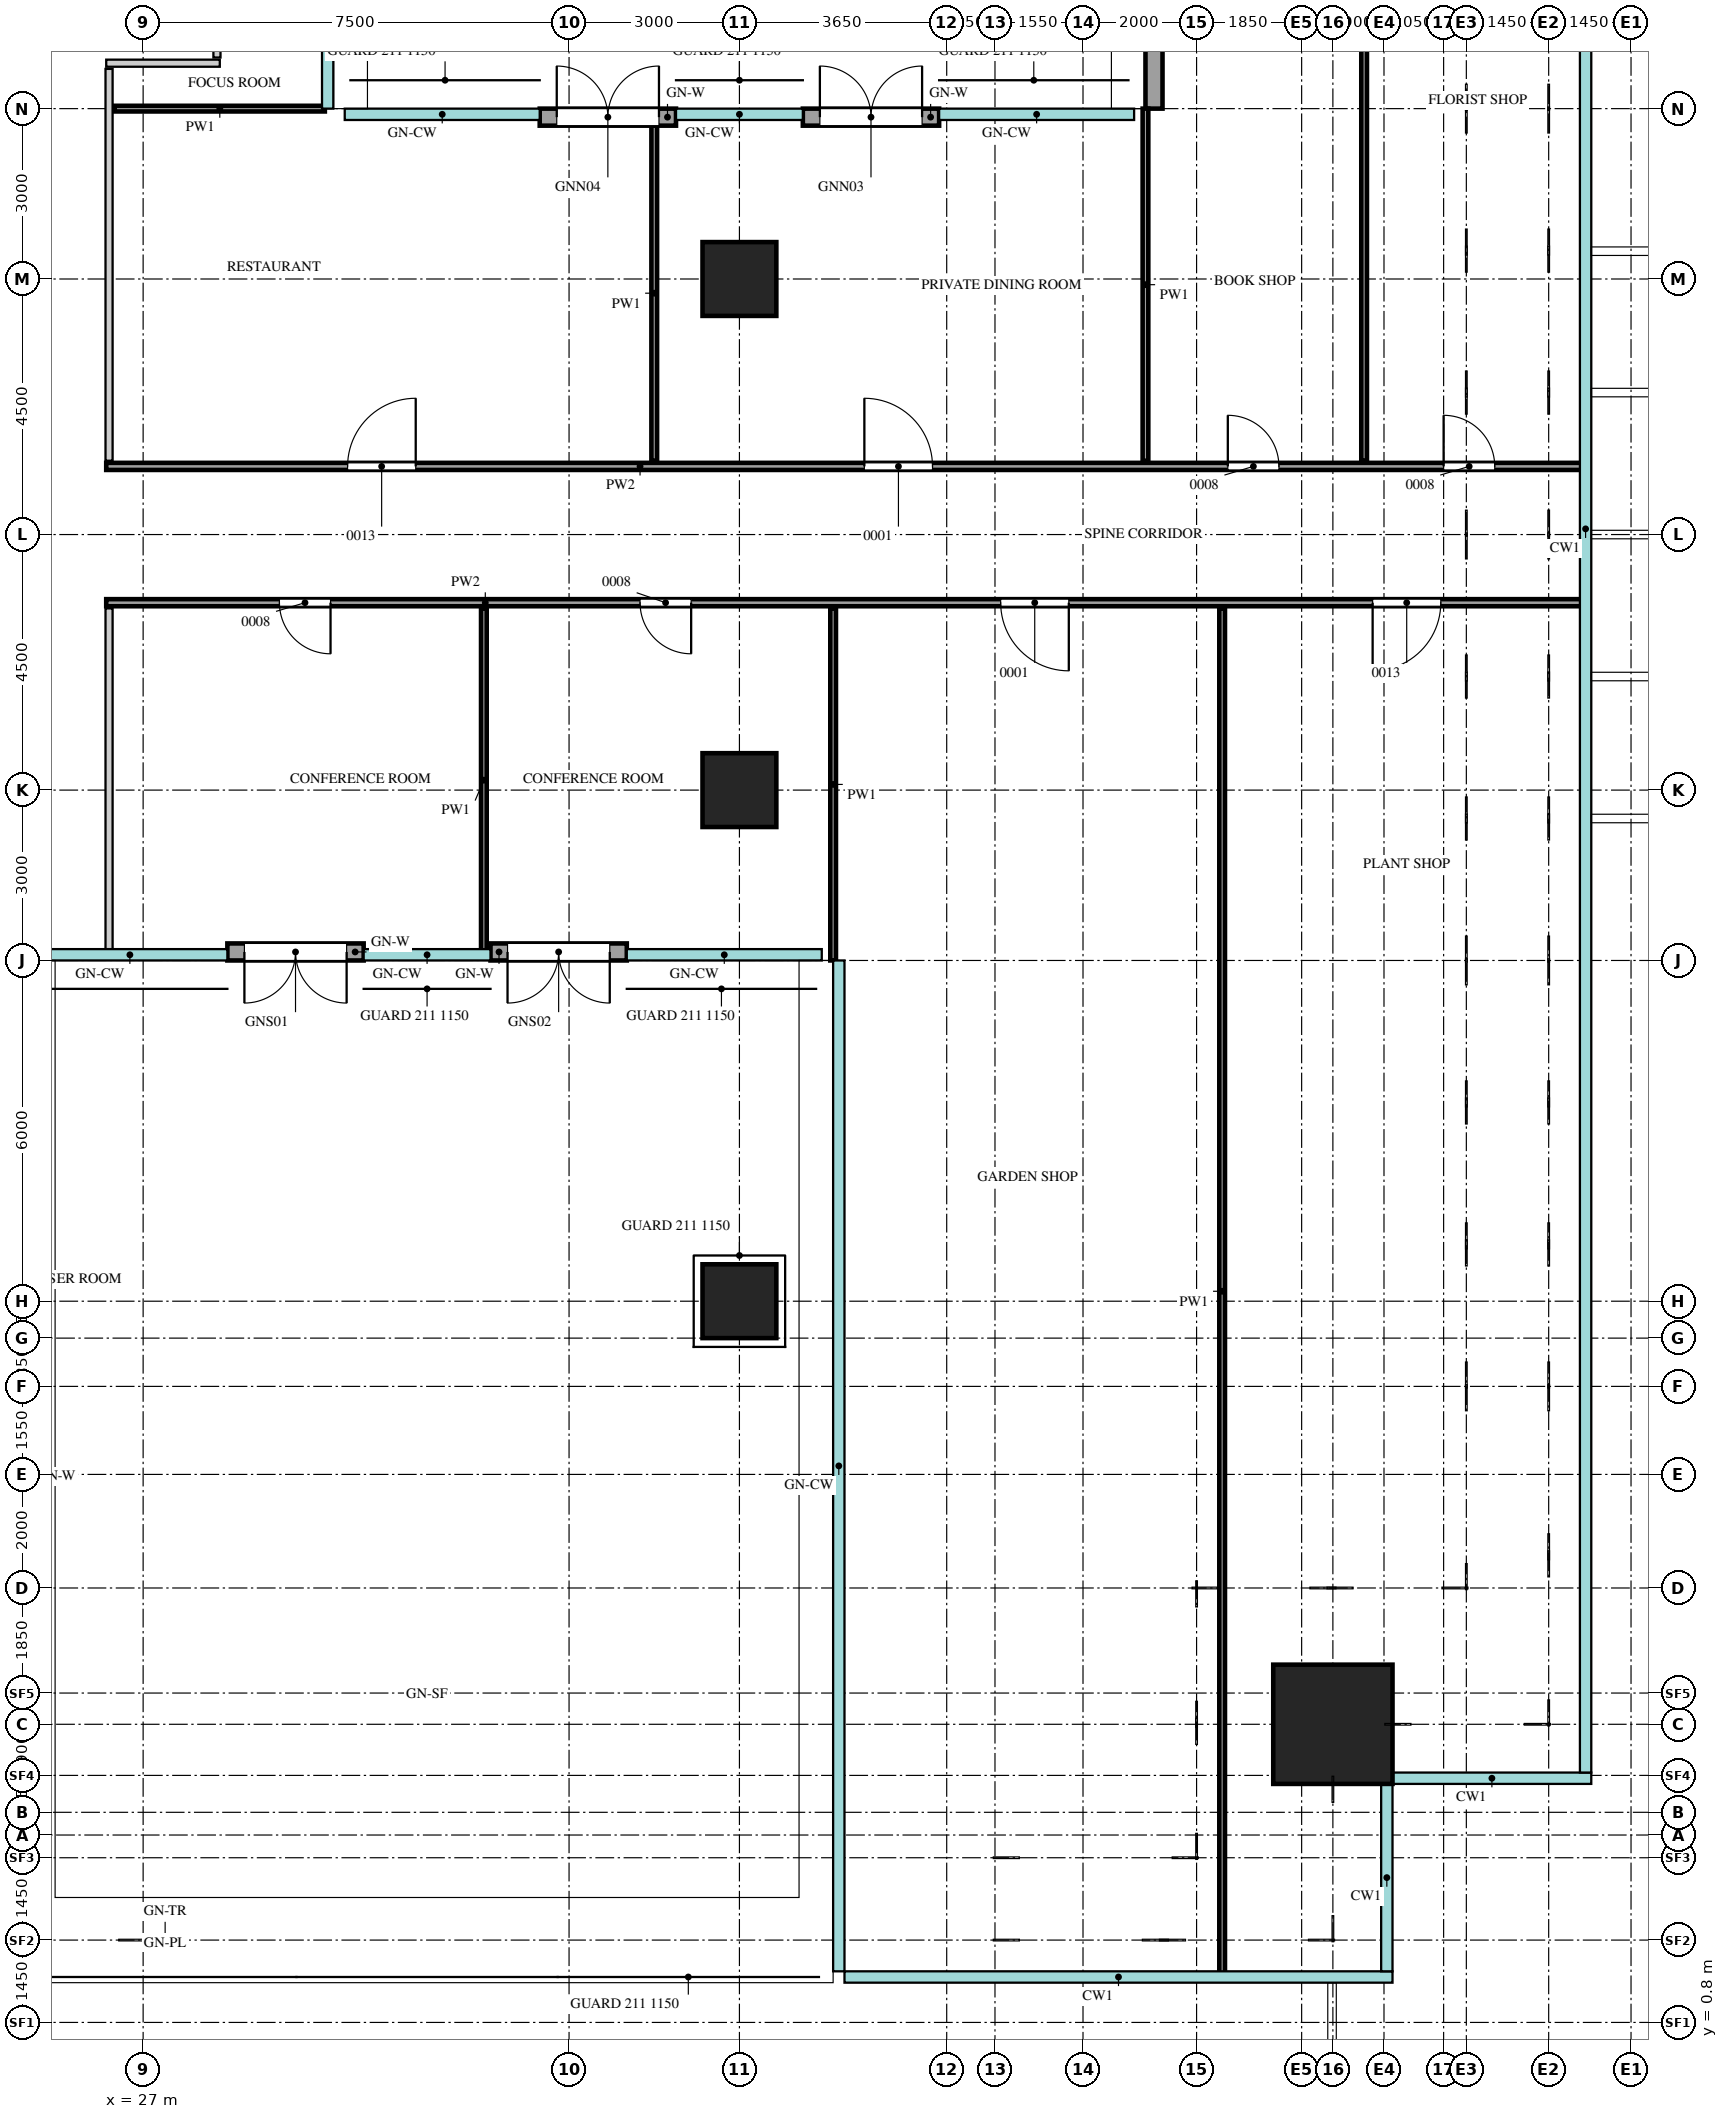
"""IFC4 building model, lengths in metres.
Left out: names, types, materials, properties, quantities, classifications, styles, units other than length and angle.
Written with IfcOpenShell. Run it as: python <this file> out.ifc"""

import sys

from ifc_helpers import new_model, si_unit, direction, frame, frame_2d, origin, origin_2d, place, context, subcontext, project, spatial, rectangle, extrude, source, transform, mapped, element, fill, save


model = new_model("IFC4")
c1 = context("Model", 3, precision=1e-05, world=origin(), true_north=direction((0.0, 1.0)))
c2 = subcontext(c1, "Body", "Model", "MODEL_VIEW")
j1 = project(units=[si_unit("LENGTHUNIT", "METRE"), si_unit("PLANEANGLEUNIT", "RADIAN")], contexts=[c1])
p1 = place(None, origin())
s1 = spatial("IfcSite", under=j1, at=p1, CompositionType="ELEMENT")
p2 = place(p1, origin())
s2 = spatial("IfcBuilding", under=s1, at=p2, CompositionType="ELEMENT")
p3 = place(p2, frame((0.0, 0.0, 158.7)))
s3 = spatial("IfcBuildingStorey", under=s2, at=p3, CompositionType="ELEMENT", Elevation=158.7)
m1 = source(origin(), c2, "Body", "SweptSolid", [
    extrude(rectangle(XDim=2.1, YDim=2.1, at=origin_2d()), origin(), (0.0, 0.0, 1.0), 6.0),
])
p4 = place(p3, frame((47.95, 6.05, 0.0), z_axis=(0.0, 0.0, 1.0), x_axis=(1.0, 0.0, 0.0)))
e1 = element("IfcColumn", 1, at=p4, inside=s3, PredefinedType="COLUMN", context=c2, shape_type="MappedRepresentation", body=[
    mapped(m1, transform((0.0, 0.0, 0.0))),
])
m2 = source(origin(), c2, "Body", "SweptSolid", [
    extrude(rectangle(XDim=1.3, YDim=1.3, at=origin_2d()), origin(), (0.0, 0.0, 1.0), 6.0),
])
p5 = place(p3, frame((37.5, 13.5, 0.0), z_axis=(0.0, 0.0, 1.0), x_axis=(1.0, 0.0, 0.0)))
e2 = element("IfcColumn", 2, at=p5, inside=s3, PredefinedType="COLUMN", context=c2, shape_type="MappedRepresentation", body=[
    mapped(m2, transform((0.0, 0.0, 0.0))),
])
m3 = source(origin(), c2, "Body", "SweptSolid", [
    extrude(rectangle(XDim=1.3, YDim=1.3, at=origin_2d()), origin(), (0.0, 0.0, 1.0), 5.75),
])
for number, where, z_axis, x_axis in (
    (3, (37.5, 22.5, 0.0), (0.0, 0.0, 1.0), (1.0, 0.0, 0.0)),
    (4, (37.5, 31.5, 0.0), (0.0, 0.0, 1.0), (1.0, 0.0, 0.0)),
):
    element("IfcColumn", number, at=place(p3, frame(where, z_axis=z_axis, x_axis=x_axis)), inside=s3, PredefinedType="COLUMN", context=c2, shape_type="MappedRepresentation", body=[
        mapped(m3, transform((0.0, 0.0, 0.0))),
    ])
m4 = source(origin(), c2, "Body", "SweptSolid", [
    extrude(rectangle(XDim=2.4, YDim=0.3, at=frame_2d((1.2, 0.0))), origin(), (0.0, 0.0, 1.0), 5.55),
])
p6 = place(p3, frame((28.483, 19.65, 0.0), z_axis=(0.0, 0.0, 1.0), x_axis=(1.0, 0.0, 0.0)))
e5 = element("IfcWall", 5, at=p6, inside=s3, PredefinedType="SOLIDWALL", context=c2, shape_type="MappedRepresentation", body=[
    mapped(m4, transform((0.0, 0.0, 0.0))),
])
m5 = source(origin(), c2, "Body", "SweptSolid", [
    extrude(rectangle(XDim=1.8, YDim=2.4, at=frame_2d((0.9, 1.2))), frame((0.0, 0.16, 0.0), z_axis=(0.0, -1.0, 0.0), x_axis=(1.0, 0.0, 0.0)), (0.0, 0.0, 1.0), 0.32),
])
p7 = place(p6, frame((2.1, 0.0, 0.0), z_axis=(0.0, 0.0, 1.0), x_axis=(-1.0, 0.0, 0.0)))
e6 = element("IfcOpeningElement", 6, at=p7, cuts=e5, PredefinedType="OPENING", context=c2, shape_type="MappedRepresentation", body=[
    mapped(m5, transform((0.0, 0.0, 0.0))),
])
p8 = place(p3, frame((33.117, 19.65, 0.0), z_axis=(0.0, 0.0, 1.0), x_axis=(1.0, 0.0, 0.0)))
e7 = element("IfcWall", 7, at=p8, inside=s3, PredefinedType="SOLIDWALL", context=c2, shape_type="MappedRepresentation", body=[
    mapped(m4, transform((0.0, 0.0, 0.0))),
])
p9 = place(p8, frame((2.1, 0.0, 0.0), z_axis=(0.0, 0.0, 1.0), x_axis=(-1.0, 0.0, 0.0)))
e8 = element("IfcOpeningElement", 8, at=p9, cuts=e7, PredefinedType="OPENING", context=c2, shape_type="MappedRepresentation", body=[
    mapped(m5, transform((0.0, 0.0, 0.0))),
])
m6 = source(origin(), c2, "Body", "SweptSolid", [
    extrude(rectangle(XDim=17.8, YDim=0.3, at=frame_2d((8.9, 0.0))), origin(), (0.0, 0.0, 1.0), 5.55),
])
p10 = place(p3, frame((44.8, 52.3, 0.0), z_axis=(0.0, 0.0, 1.0), x_axis=(0.0, -1.0, 0.0)))
e9 = element("IfcWall", 9, at=p10, inside=s3, PredefinedType="SOLIDWALL", context=c2, shape_type="MappedRepresentation", body=[
    mapped(m6, transform((0.0, 0.0, 0.0))),
])
p11 = place(p3, frame((41.017, 34.35, 0.0), z_axis=(0.0, 0.0, 1.0), x_axis=(-1.0, 0.0, 0.0)))
e10 = element("IfcWall", 10, at=p11, inside=s3, PredefinedType="SOLIDWALL", context=c2, shape_type="MappedRepresentation", body=[
    mapped(m4, transform((0.0, 0.0, 0.0))),
])
p12 = place(p11, frame((2.1, 0.0, 0.0), z_axis=(0.0, 0.0, 1.0), x_axis=(-1.0, 0.0, 0.0)))
e11 = element("IfcOpeningElement", 11, at=p12, cuts=e10, PredefinedType="OPENING", context=c2, shape_type="MappedRepresentation", body=[
    mapped(m5, transform((0.0, 0.0, 0.0))),
])
p13 = place(p3, frame((36.383, 34.35, 0.0), z_axis=(0.0, 0.0, 1.0), x_axis=(-1.0, 0.0, 0.0)))
e12 = element("IfcWall", 12, at=p13, inside=s3, PredefinedType="SOLIDWALL", context=c2, shape_type="MappedRepresentation", body=[
    mapped(m4, transform((0.0, 0.0, 0.0))),
])
p14 = place(p13, frame((2.1, 0.0, 0.0), z_axis=(0.0, 0.0, 1.0), x_axis=(-1.0, 0.0, 0.0)))
e13 = element("IfcOpeningElement", 13, at=p14, cuts=e12, PredefinedType="OPENING", context=c2, shape_type="MappedRepresentation", body=[
    mapped(m5, transform((0.0, 0.0, 0.0))),
])
m7 = source(origin(), c2, "Body", "SweptSolid", [
    extrude(rectangle(XDim=24.05, YDim=0.1, at=frame_2d((12.025, 0.0))), origin(), (0.0, 0.0, 1.0), 5.75),
])
p15 = place(p3, frame((46.0, 1.65, 0.0), z_axis=(0.0, 0.0, 1.0), x_axis=(0.0, 1.0, 0.0)))
e14 = element("IfcWall", 14, at=p15, inside=s3, PredefinedType="PARTITIONING", context=c2, shape_type="MappedRepresentation", body=[
    mapped(m7, transform((0.0, 0.0, 0.0))),
])
m8 = source(origin(), c2, "Body", "SweptSolid", [
    extrude(rectangle(XDim=6.05, YDim=0.125, at=frame_2d((3.025, 0.0))), origin(), (0.0, 0.0, 1.0), 5.75),
])
p16 = place(p3, frame((26.4, 19.65, 0.0), z_axis=(0.0, 0.0, 1.0), x_axis=(0.0, 1.0, 0.0)))
e15 = element("IfcWall", 15, at=p16, inside=s3, PredefinedType="PARTITIONING", context=c2, shape_type="MappedRepresentation", body=[
    mapped(m8, transform((0.0, 0.0, 0.0))),
])
m9 = source(origin(), c2, "Body", "SweptSolid", [
    extrude(rectangle(XDim=6.05, YDim=0.1, at=frame_2d((3.025, 0.0))), origin(), (0.0, 0.0, 1.0), 5.75),
])
p17 = place(p3, frame((33.0, 19.65, 0.0), z_axis=(0.0, 0.0, 1.0), x_axis=(0.0, 1.0, 0.0)))
e16 = element("IfcWall", 16, at=p17, inside=s3, PredefinedType="PARTITIONING", context=c2, shape_type="MappedRepresentation", body=[
    mapped(m9, transform((0.0, 0.0, 0.0))),
])
m10 = source(origin(), c2, "Body", "SweptSolid", [
    extrude(rectangle(XDim=6.2, YDim=0.1, at=frame_2d((3.1, 0.0))), origin(), (0.0, 0.0, 1.0), 5.75),
])
p18 = place(p3, frame((39.15, 19.5, 0.0), z_axis=(0.0, 0.0, 1.0), x_axis=(0.0, 1.0, 0.0)))
e17 = element("IfcWall", 17, at=p18, inside=s3, PredefinedType="PARTITIONING", context=c2, shape_type="MappedRepresentation", body=[
    mapped(m10, transform((0.0, 0.0, 0.0))),
])
m11 = source(origin(), c2, "Body", "SweptSolid", [
    extrude(rectangle(XDim=26.0, YDim=0.125, at=frame_2d((13.0, 0.0))), origin(), (0.0, 0.0, 1.0), 5.75),
])
p19 = place(p3, frame((26.35, 25.8, 0.0), z_axis=(0.0, 0.0, 1.0), x_axis=(1.0, 0.0, 0.0)))
e18 = element("IfcWall", 18, at=p19, inside=s3, PredefinedType="PARTITIONING", context=c2, shape_type="MappedRepresentation", body=[
    mapped(m11, transform((0.0, 0.0, 0.0))),
])
m12 = source(origin(), c2, "Body", "SweptSolid", [
    extrude(rectangle(XDim=1.2, YDim=2.1, at=frame_2d((0.6, 1.05))), frame((0.0, 0.073, 0.0), z_axis=(0.0, -1.0, 0.0), x_axis=(1.0, 0.0, 0.0)), (0.0, 0.0, 1.0), 0.145),
])
p20 = place(p19, frame((15.75, 0.0, 0.0)))
e19 = element("IfcOpeningElement", 19, at=p20, cuts=e18, PredefinedType="OPENING", context=c2, shape_type="MappedRepresentation", body=[
    mapped(m12, transform((0.0, 0.0, 0.0))),
])
p21 = place(p19, frame((22.3, 0.0, 0.0)))
e20 = element("IfcOpeningElement", 20, at=p21, cuts=e18, PredefinedType="OPENING", context=c2, shape_type="MappedRepresentation", body=[
    mapped(m12, transform((0.0, 0.0, 0.0))),
])
m13 = source(origin(), c2, "Body", "SweptSolid", [
    extrude(rectangle(XDim=0.9, YDim=2.1, at=frame_2d((0.45, 1.05))), frame((0.0, 0.073, 0.0), z_axis=(0.0, -1.0, 0.0), x_axis=(1.0, 0.0, 0.0)), (0.0, 0.0, 1.0), 0.145),
])
p22 = place(p19, frame((3.05, 0.0, 0.0)))
e21 = element("IfcOpeningElement", 21, at=p22, cuts=e18, PredefinedType="OPENING", context=c2, shape_type="MappedRepresentation", body=[
    mapped(m13, transform((0.0, 0.0, 0.0))),
])
p23 = place(p19, frame((9.4, 0.0, 0.0)))
e22 = element("IfcOpeningElement", 22, at=p23, cuts=e18, PredefinedType="OPENING", context=c2, shape_type="MappedRepresentation", body=[
    mapped(m13, transform((0.0, 0.0, 0.0))),
])
p24 = place(p3, frame((26.35, 28.2, 0.0), z_axis=(0.0, 0.0, 1.0), x_axis=(1.0, 0.0, 0.0)))
e23 = element("IfcWall", 23, at=p24, inside=s3, PredefinedType="PARTITIONING", context=c2, shape_type="MappedRepresentation", body=[
    mapped(m11, transform((0.0, 0.0, 0.0))),
])
p25 = place(p24, frame((19.75, 0.0, 0.0)))
e24 = element("IfcOpeningElement", 24, at=p25, cuts=e23, PredefinedType="OPENING", context=c2, shape_type="MappedRepresentation", body=[
    mapped(m13, transform((0.0, 0.0, 0.0))),
])
p26 = place(p24, frame((23.55, 0.0, 0.0)))
e25 = element("IfcOpeningElement", 25, at=p26, cuts=e23, PredefinedType="OPENING", context=c2, shape_type="MappedRepresentation", body=[
    mapped(m13, transform((0.0, 0.0, 0.0))),
])
p27 = place(p24, frame((4.25, 0.0, 0.0)))
e26 = element("IfcOpeningElement", 26, at=p27, cuts=e23, PredefinedType="OPENING", context=c2, shape_type="MappedRepresentation", body=[
    mapped(m12, transform((0.0, 0.0, 0.0))),
])
p28 = place(p24, frame((13.35, 0.0, 0.0)))
e27 = element("IfcOpeningElement", 27, at=p28, cuts=e23, PredefinedType="OPENING", context=c2, shape_type="MappedRepresentation", body=[
    mapped(m12, transform((0.0, 0.0, 0.0))),
])
m14 = source(origin(), c2, "Body", "SweptSolid", [
    extrude(rectangle(XDim=6.9, YDim=0.125, at=frame_2d((3.45, 0.0))), origin(), (0.0, 0.0, 1.0), 5.75),
])
p29 = place(p3, frame((26.4, 28.3, 0.0), z_axis=(0.0, 0.0, 1.0), x_axis=(0.0, 1.0, 0.0)))
e28 = element("IfcWall", 28, at=p29, inside=s3, PredefinedType="PARTITIONING", context=c2, shape_type="MappedRepresentation", body=[
    mapped(m14, transform((0.0, 0.0, 0.0))),
])
m15 = source(origin(), c2, "Body", "SweptSolid", [
    extrude(rectangle(XDim=5.9, YDim=0.1, at=frame_2d((2.95, 0.0))), origin(), (0.0, 0.0, 1.0), 5.75),
])
p30 = place(p3, frame((36.0, 28.3, 0.0), z_axis=(0.0, 0.0, 1.0), x_axis=(0.0, 1.0, 0.0)))
e29 = element("IfcWall", 29, at=p30, inside=s3, PredefinedType="PARTITIONING", context=c2, shape_type="MappedRepresentation", body=[
    mapped(m15, transform((0.0, 0.0, 0.0))),
])
p31 = place(p3, frame((44.65, 28.3, 0.0), z_axis=(0.0, 0.0, 1.0), x_axis=(0.0, 1.0, 0.0)))
e30 = element("IfcWall", 30, at=p31, inside=s3, PredefinedType="PARTITIONING", context=c2, shape_type="MappedRepresentation", body=[
    mapped(m10, transform((0.0, 0.0, 0.0))),
])
p32 = place(p3, frame((48.5, 28.3, 0.0), z_axis=(0.0, 0.0, 1.0), x_axis=(0.0, 1.0, 0.0)))
e31 = element("IfcWall", 31, at=p32, inside=s3, PredefinedType="PARTITIONING", context=c2, shape_type="MappedRepresentation", body=[
    mapped(m7, transform((0.0, 0.0, 0.0))),
])
m16 = source(origin(), c2, "Body", "SweptSolid", [
    extrude(rectangle(XDim=3.7, YDim=0.1, at=frame_2d((1.85, 0.0))), origin(), (0.0, 0.0, 1.0), 5.75),
])
p33 = place(p3, frame((26.5, 34.5, 0.0), z_axis=(0.0, 0.0, 1.0), x_axis=(1.0, 0.0, 0.0)))
e32 = element("IfcWall", 32, at=p33, inside=s3, PredefinedType="PARTITIONING", context=c2, shape_type="MappedRepresentation", body=[
    mapped(m16, transform((0.0, 0.0, 0.0))),
])
m17 = source(origin(), c2, "Body", "SweptSolid", [
    extrude(rectangle(XDim=2.0, YDim=0.125, at=frame_2d((1.0, 0.0))), origin(), (0.0, 0.0, 1.0), 5.75),
])
p34 = place(p3, frame((26.35, 35.3, 0.0), z_axis=(0.0, 0.0, 1.0), x_axis=(1.0, 0.0, 0.0)))
e33 = element("IfcWall", 33, at=p34, inside=s3, PredefinedType="PARTITIONING", context=c2, shape_type="MappedRepresentation", body=[
    mapped(m17, transform((0.0, 0.0, 0.0))),
])
m18 = source(origin(), c2, "Body", "SweptSolid", [
    extrude(rectangle(XDim=2.2, YDim=0.125, at=frame_2d((1.1, 0.0))), origin(), (0.0, 0.0, 1.0), 5.75),
])
p35 = place(p3, frame((28.3, 35.4, 0.0), z_axis=(0.0, 0.0, 1.0), x_axis=(0.0, 1.0, 0.0)))
e34 = element("IfcWall", 34, at=p35, inside=s3, PredefinedType="PARTITIONING", context=c2, shape_type="MappedRepresentation", body=[
    mapped(m18, transform((0.0, 0.0, 0.0))),
])
p36 = place(p35, frame((0.65, 0.0, 0.0)))
e35 = element("IfcOpeningElement", 35, at=p36, cuts=e34, PredefinedType="OPENING", context=c2, shape_type="MappedRepresentation", body=[
    mapped(m13, transform((0.0, 0.0, 0.0))),
])
m19 = source(origin(), c2, "Body", "SweptSolid", [
    extrude(rectangle(XDim=1.8, YDim=2.4, at=frame_2d((0.9, 1.2))), frame((0.0, 0.025, 0.0), z_axis=(0.0, -1.0, 0.0), x_axis=(1.0, 0.0, 0.0)), (0.0, 0.0, 1.0), 0.05),
])
p37 = place(p7, origin())
e36 = element("IfcDoor", 36, at=p37, inside=s3, OperationType="DOUBLE_DOOR_DOUBLE_SWING", PredefinedType="DOOR", context=c2, shape_type="MappedRepresentation", body=[
    mapped(m19, transform((0.0, 0.0, 0.0))),
])
fill(e6, e36)
p38 = place(p9, origin())
e37 = element("IfcDoor", 37, at=p38, inside=s3, OperationType="DOUBLE_DOOR_DOUBLE_SWING", PredefinedType="DOOR", context=c2, shape_type="MappedRepresentation", body=[
    mapped(m19, transform((0.0, 0.0, 0.0))),
])
fill(e8, e37)
p39 = place(p12, origin())
e38 = element("IfcDoor", 38, at=p39, inside=s3, OperationType="DOUBLE_DOOR_DOUBLE_SWING", PredefinedType="DOOR", context=c2, shape_type="MappedRepresentation", body=[
    mapped(m19, transform((0.0, 0.0, 0.0))),
])
fill(e11, e38)
p40 = place(p14, origin())
e39 = element("IfcDoor", 39, at=p40, inside=s3, OperationType="DOUBLE_DOOR_DOUBLE_SWING", PredefinedType="DOOR", context=c2, shape_type="MappedRepresentation", body=[
    mapped(m19, transform((0.0, 0.0, 0.0))),
])
fill(e13, e39)
m20 = source(origin(), c2, "Body", "SweptSolid", [
    extrude(rectangle(XDim=1.2, YDim=2.1, at=frame_2d((0.6, 1.05))), frame((0.0, 0.025, 0.0), z_axis=(0.0, -1.0, 0.0), x_axis=(1.0, 0.0, 0.0)), (0.0, 0.0, 1.0), 0.05),
])
p41 = place(p20, origin())
e40 = element("IfcDoor", 40, at=p41, inside=s3, OperationType="SINGLE_SWING_RIGHT", PredefinedType="DOOR", context=c2, shape_type="MappedRepresentation", body=[
    mapped(m20, transform((0.0, 0.0, 0.0))),
])
fill(e19, e40)
p42 = place(p21, origin())
e41 = element("IfcDoor", 41, at=p42, inside=s3, OperationType="SINGLE_SWING_LEFT", PredefinedType="DOOR", context=c2, shape_type="MappedRepresentation", body=[
    mapped(m20, transform((0.0, 0.0, 0.0))),
])
fill(e20, e41)
m21 = source(origin(), c2, "Body", "SweptSolid", [
    extrude(rectangle(XDim=0.9, YDim=2.1, at=frame_2d((0.45, 1.05))), frame((0.0, 0.025, 0.0), z_axis=(0.0, -1.0, 0.0), x_axis=(1.0, 0.0, 0.0)), (0.0, 0.0, 1.0), 0.05),
])
p43 = place(p25, origin())
e42 = element("IfcDoor", 42, at=p43, inside=s3, OperationType="SINGLE_SWING_RIGHT", PredefinedType="DOOR", context=c2, shape_type="MappedRepresentation", body=[
    mapped(m21, transform((0.0, 0.0, 0.0))),
])
fill(e24, e42)
p44 = place(p26, origin())
e43 = element("IfcDoor", 43, at=p44, inside=s3, OperationType="SINGLE_SWING_RIGHT", PredefinedType="DOOR", context=c2, shape_type="MappedRepresentation", body=[
    mapped(m21, transform((0.0, 0.0, 0.0))),
])
fill(e25, e43)
p45 = place(p22, origin())
e44 = element("IfcDoor", 44, at=p45, inside=s3, OperationType="SINGLE_SWING_RIGHT", PredefinedType="DOOR", context=c2, shape_type="MappedRepresentation", body=[
    mapped(m21, transform((0.0, 0.0, 0.0))),
])
fill(e21, e44)
p46 = place(p23, origin())
e45 = element("IfcDoor", 45, at=p46, inside=s3, OperationType="SINGLE_SWING_RIGHT", PredefinedType="DOOR", context=c2, shape_type="MappedRepresentation", body=[
    mapped(m21, transform((0.0, 0.0, 0.0))),
])
fill(e22, e45)
p47 = place(p27, origin())
e46 = element("IfcDoor", 46, at=p47, inside=s3, OperationType="SINGLE_SWING_LEFT", PredefinedType="DOOR", context=c2, shape_type="MappedRepresentation", body=[
    mapped(m20, transform((0.0, 0.0, 0.0))),
])
fill(e26, e46)
p48 = place(p28, origin())
e47 = element("IfcDoor", 47, at=p48, inside=s3, OperationType="SINGLE_SWING_RIGHT", PredefinedType="DOOR", context=c2, shape_type="MappedRepresentation", body=[
    mapped(m20, transform((0.0, 0.0, 0.0))),
])
fill(e27, e47)
save(model, sys.argv[1])
